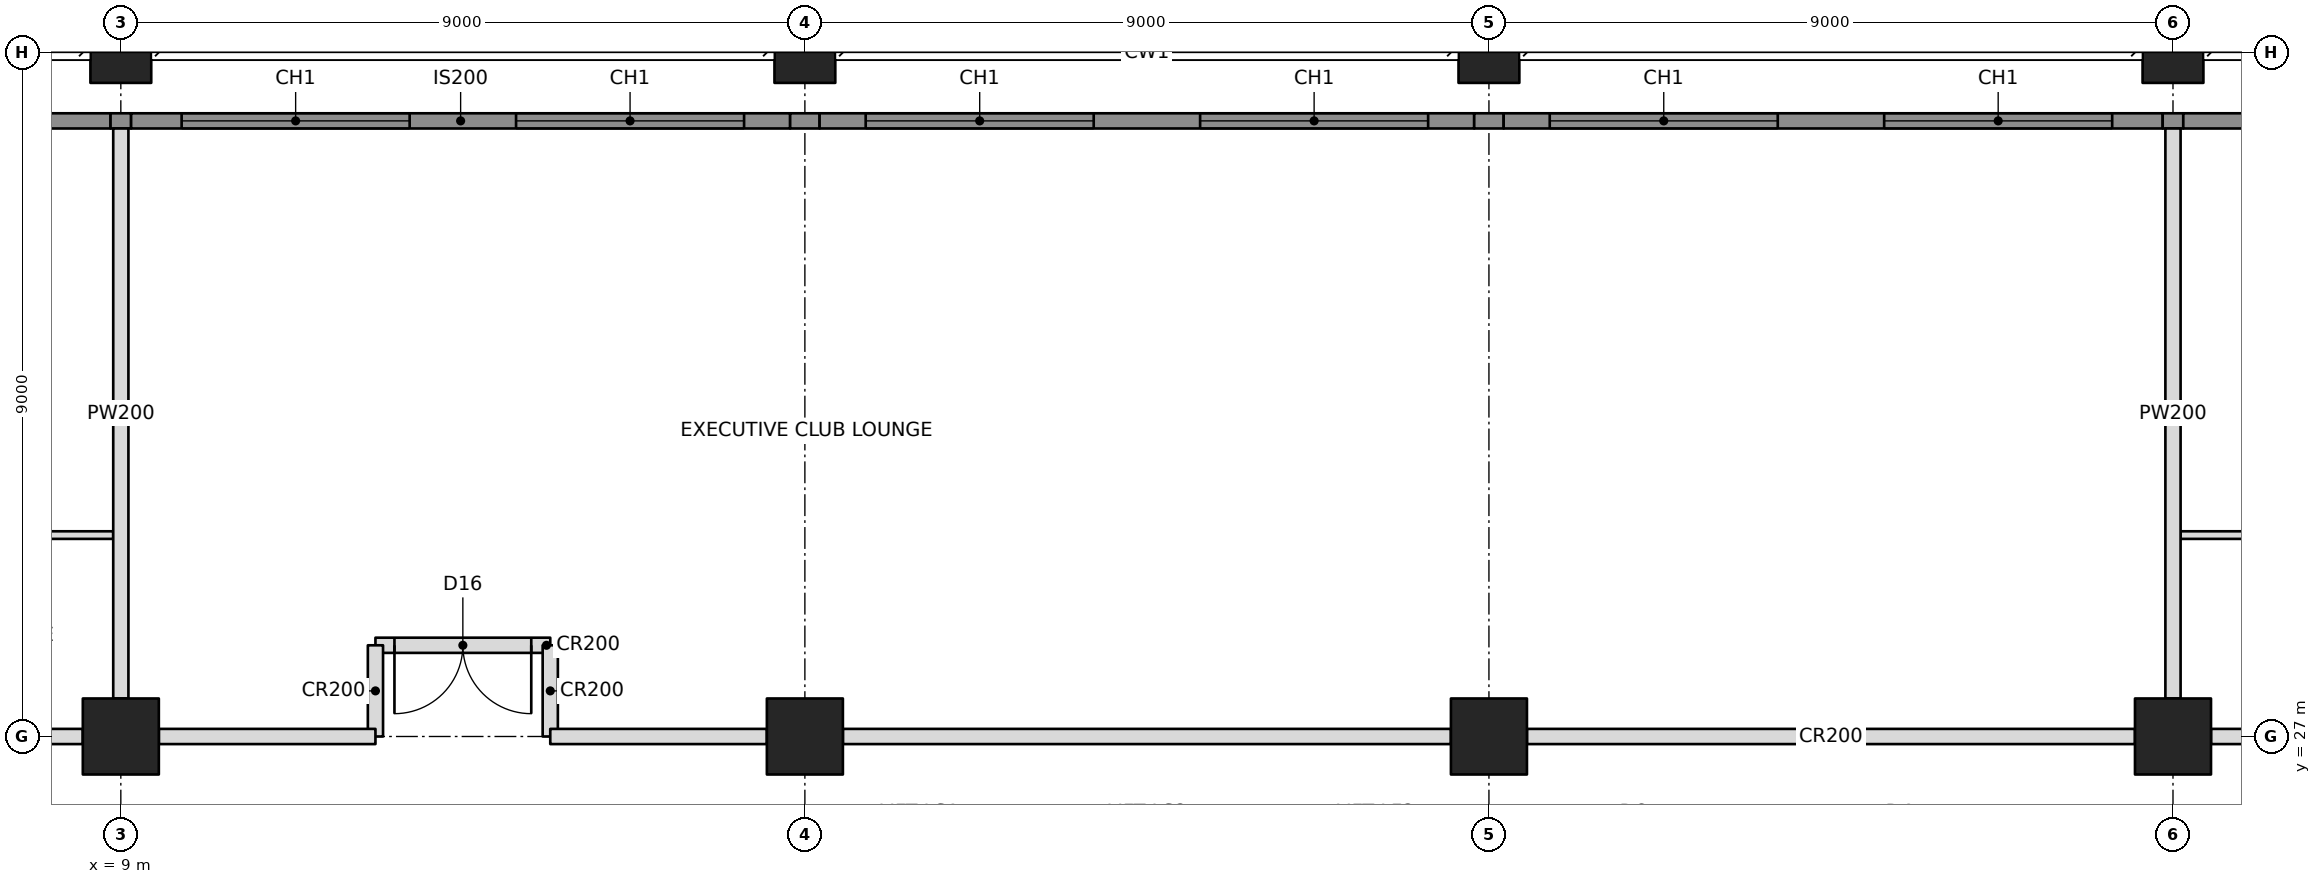
"""IFC4 building model, lengths in metres.
Left out: names, types, materials, properties, quantities, classifications, styles, units other than length and angle.
Written with IfcOpenShell. Run it as: python <this file> out.ifc"""

import sys

from ifc_helpers import new_model, si_unit, direction, frame, frame_2d, origin, origin_2d, place, context, subcontext, project, spatial, rectangle, hollow_rectangle, extrude, element, fill, save


model = new_model("IFC4")
c1 = context("Model", 3, precision=1e-05, world=origin(), true_north=direction((0.0, 1.0)))
c2 = subcontext(c1, "Body", "Model", "MODEL_VIEW")
j1 = project(units=[si_unit("LENGTHUNIT", "METRE"), si_unit("PLANEANGLEUNIT", "RADIAN")], contexts=[c1])
p1 = place(None, origin())
s1 = spatial("IfcSite", under=j1, at=p1, CompositionType="ELEMENT")
p2 = place(p1, origin())
s2 = spatial("IfcBuilding", under=s1, at=p2, CompositionType="ELEMENT")
p3 = place(p2, frame((0.0, 0.0, 94.2)))
s3 = spatial("IfcBuildingStorey", under=s2, at=p3, CompositionType="ELEMENT", Elevation=94.2)
p4 = place(p3, frame((9.0, 27.0, 0.0), z_axis=(0.0, 0.0, 1.0), x_axis=(1.0, 0.0, 0.0)))
e1 = element("IfcColumn", 1, at=p4, inside=s3, PredefinedType="COLUMN", context=c2, shape_type="SweptSolid", body=[
    extrude(hollow_rectangle(XDim=1.0, YDim=1.0, WallThickness=0.1, at=origin_2d()), origin(), (0.0, 0.0, 1.0), 3.4),
])
p5 = place(p3, frame((9.0, 36.0, 0.0), z_axis=(0.0, 0.0, 1.0), x_axis=(1.0, 0.0, 0.0)))
e2 = element("IfcColumn", 2, at=p5, inside=s3, PredefinedType="COLUMN", context=c2, shape_type="SweptSolid", body=[
    extrude(hollow_rectangle(XDim=0.8, YDim=0.8, WallThickness=0.07, at=origin_2d()), origin(), (0.0, 0.0, 1.0), 3.4),
])
p6 = place(p3, frame((18.0, 27.0, 0.0), z_axis=(0.0, 0.0, 1.0), x_axis=(1.0, 0.0, 0.0)))
e3 = element("IfcColumn", 3, at=p6, inside=s3, PredefinedType="COLUMN", context=c2, shape_type="SweptSolid", body=[
    extrude(hollow_rectangle(XDim=1.0, YDim=1.0, WallThickness=0.1, at=origin_2d()), origin(), (0.0, 0.0, 1.0), 3.4),
])
p7 = place(p3, frame((18.0, 36.0, 0.0), z_axis=(0.0, 0.0, 1.0), x_axis=(1.0, 0.0, 0.0)))
e4 = element("IfcColumn", 4, at=p7, inside=s3, PredefinedType="COLUMN", context=c2, shape_type="SweptSolid", body=[
    extrude(hollow_rectangle(XDim=0.8, YDim=0.8, WallThickness=0.07, at=origin_2d()), origin(), (0.0, 0.0, 1.0), 3.4),
])
p8 = place(p3, frame((27.0, 27.0, 0.0), z_axis=(0.0, 0.0, 1.0), x_axis=(1.0, 0.0, 0.0)))
e5 = element("IfcColumn", 5, at=p8, inside=s3, PredefinedType="COLUMN", context=c2, shape_type="SweptSolid", body=[
    extrude(hollow_rectangle(XDim=1.0, YDim=1.0, WallThickness=0.1, at=origin_2d()), origin(), (0.0, 0.0, 1.0), 3.4),
])
p9 = place(p3, frame((27.0, 36.0, 0.0), z_axis=(0.0, 0.0, 1.0), x_axis=(1.0, 0.0, 0.0)))
e6 = element("IfcColumn", 6, at=p9, inside=s3, PredefinedType="COLUMN", context=c2, shape_type="SweptSolid", body=[
    extrude(hollow_rectangle(XDim=0.8, YDim=0.8, WallThickness=0.07, at=origin_2d()), origin(), (0.0, 0.0, 1.0), 3.4),
])
p10 = place(p3, frame((36.0, 27.0, 0.0), z_axis=(0.0, 0.0, 1.0), x_axis=(1.0, 0.0, 0.0)))
e7 = element("IfcColumn", 7, at=p10, inside=s3, PredefinedType="COLUMN", context=c2, shape_type="SweptSolid", body=[
    extrude(hollow_rectangle(XDim=1.0, YDim=1.0, WallThickness=0.1, at=origin_2d()), origin(), (0.0, 0.0, 1.0), 3.4),
])
p11 = place(p3, frame((36.0, 36.0, 0.0), z_axis=(0.0, 0.0, 1.0), x_axis=(1.0, 0.0, 0.0)))
e8 = element("IfcColumn", 8, at=p11, inside=s3, PredefinedType="COLUMN", context=c2, shape_type="SweptSolid", body=[
    extrude(hollow_rectangle(XDim=0.8, YDim=0.8, WallThickness=0.07, at=origin_2d()), origin(), (0.0, 0.0, 1.0), 3.4),
])
p12 = place(p3, frame((3.0, 35.1, 0.0), z_axis=(0.0, 0.0, 1.0), x_axis=(1.0, 0.0, 0.0)))
e9 = element("IfcWall", 9, at=p12, inside=s3, PredefinedType="SOLIDWALL", context=c2, shape_type="SweptSolid", body=[
    extrude(rectangle(XDim=5.865, YDim=0.2, at=frame_2d((2.932, 0.0))), origin(), (0.0, 0.0, 1.0), 3.2),
])
p13 = place(p12, frame((1.45, 0.0, 0.6)))
e10 = element("IfcOpeningElement", 10, at=p13, cuts=e9, PredefinedType="OPENING", context=c2, shape_type="SweptSolid", body=[
    extrude(rectangle(XDim=3.0, YDim=2.2, at=frame_2d((1.5, 1.1))), frame((0.0, 0.11, 0.0), z_axis=(0.0, -1.0, 0.0), x_axis=(1.0, 0.0, 0.0)), (0.0, 0.0, 1.0), 0.22),
])
p14 = place(p3, frame((1.0, 27.0, 0.0), z_axis=(0.0, 0.0, 1.0), x_axis=(1.0, 0.0, 0.0)))
e11 = element("IfcWall", 11, at=p14, inside=s3, PredefinedType="PARTITIONING", context=c2, shape_type="SweptSolid", body=[
    extrude(rectangle(XDim=7.5, YDim=0.2, at=frame_2d((3.75, 0.0))), origin(), (0.0, 0.0, 1.0), 2.438),
])
p15 = place(p14, frame((0.25, 0.0, 0.0)))
e12 = element("IfcOpeningElement", 12, at=p15, cuts=e11, PredefinedType="OPENING", context=c2, shape_type="SweptSolid", body=[
    extrude(rectangle(XDim=0.9, YDim=2.1, at=frame_2d((0.45, 1.05))), frame((0.0, 0.11, 0.0), z_axis=(0.0, -1.0, 0.0), x_axis=(1.0, 0.0, 0.0)), (0.0, 0.0, 1.0), 0.22),
])
p16 = place(p3, frame((9.5, 27.0, 0.0), z_axis=(0.0, 0.0, 1.0), x_axis=(1.0, 0.0, 0.0)))
e13 = element("IfcWall", 13, at=p16, inside=s3, PredefinedType="PARTITIONING", context=c2, shape_type="SweptSolid", body=[
    extrude(rectangle(XDim=2.85, YDim=0.2, at=frame_2d((1.425, 0.0))), origin(), (0.0, 0.0, 1.0), 2.405),
])
for number, where, z_axis, x_axis in (
    (14, (18.5, 27.0, 0.0), (0.0, 0.0, 1.0), (1.0, 0.0, 0.0)),
    (15, (27.5, 27.0, 0.0), (0.0, 0.0, 1.0), (1.0, 0.0, 0.0)),
):
    element("IfcWall", number, at=place(p3, frame(where, z_axis=z_axis, x_axis=x_axis)), inside=s3, PredefinedType="PARTITIONING", context=c2, shape_type="SweptSolid", body=[
        extrude(rectangle(XDim=8.0, YDim=0.2, at=frame_2d((4.0, 0.0))), origin(), (0.0, 0.0, 1.0), 2.405),
    ])
p17 = place(p3, frame((36.5, 27.0, 0.0), z_axis=(0.0, 0.0, 1.0), x_axis=(1.0, 0.0, 0.0)))
e16 = element("IfcWall", 16, at=p17, inside=s3, PredefinedType="PARTITIONING", context=c2, shape_type="SweptSolid", body=[
    extrude(rectangle(XDim=7.5, YDim=0.2, at=frame_2d((3.75, 0.0))), origin(), (0.0, 0.0, 1.0), 2.438),
])
p18 = place(p17, frame((6.35, 0.0, 0.0)))
e17 = element("IfcOpeningElement", 17, at=p18, cuts=e16, PredefinedType="OPENING", context=c2, shape_type="SweptSolid", body=[
    extrude(rectangle(XDim=0.9, YDim=2.1, at=frame_2d((0.45, 1.05))), frame((0.0, 0.11, 0.0), z_axis=(0.0, -1.0, 0.0), x_axis=(1.0, 0.0, 0.0)), (0.0, 0.0, 1.0), 0.22),
])
for number, where, z_axis, x_axis in (
    (18, (9.0, 27.5, 0.0), (0.0, 0.0, 1.0), (0.0, 1.0, 0.0)),
    (19, (36.0, 27.5, 0.0), (0.0, 0.0, 1.0), (0.0, 1.0, 0.0)),
):
    element("IfcWall", number, at=place(p3, frame(where, z_axis=z_axis, x_axis=x_axis)), inside=s3, PredefinedType="PARTITIONING", context=c2, shape_type="SweptSolid", body=[
        extrude(rectangle(XDim=7.5, YDim=0.2, at=frame_2d((3.75, 0.0))), origin(), (0.0, 0.0, 1.0), 2.438),
    ])
p19 = place(p3, frame((5.45, 29.65, 0.0), z_axis=(0.0, 0.0, 1.0), x_axis=(1.0, 0.0, 0.0)))
e20 = element("IfcWall", 20, at=p19, inside=s3, PredefinedType="PARTITIONING", context=c2, shape_type="SweptSolid", body=[
    extrude(rectangle(XDim=3.45, YDim=0.1, at=frame_2d((1.725, 0.0))), origin(), (0.0, 0.0, 1.0), 2.438),
])
p20 = place(p3, frame((14.65, 27.0, 0.0), z_axis=(0.0, 0.0, 1.0), x_axis=(1.0, 0.0, 0.0)))
e21 = element("IfcWall", 21, at=p20, inside=s3, PredefinedType="PARTITIONING", context=c2, shape_type="SweptSolid", body=[
    extrude(rectangle(XDim=2.85, YDim=0.2, at=frame_2d((1.425, 0.0))), origin(), (0.0, 0.0, 1.0), 2.405),
])
for number, where, z_axis, x_axis in (
    (22, (12.35, 27.0, 0.0), (0.0, 0.0, 1.0), (0.0, 1.0, 0.0)),
    (23, (14.65, 27.0, 0.0), (0.0, 0.0, 1.0), (0.0, 1.0, 0.0)),
):
    element("IfcWall", number, at=place(p3, frame(where, z_axis=z_axis, x_axis=x_axis)), inside=s3, PredefinedType="PARTITIONING", context=c2, shape_type="SweptSolid", body=[
        extrude(rectangle(XDim=1.2, YDim=0.2, at=frame_2d((0.6, 0.0))), origin(), (0.0, 0.0, 1.0), 2.404),
    ])
p21 = place(p3, frame((12.35, 28.2, 0.0), z_axis=(0.0, 0.0, 1.0), x_axis=(1.0, 0.0, 0.0)))
e24 = element("IfcWall", 24, at=p21, inside=s3, PredefinedType="PARTITIONING", context=c2, shape_type="SweptSolid", body=[
    extrude(rectangle(XDim=2.3, YDim=0.2, at=frame_2d((1.15, 0.0))), origin(), (0.0, 0.0, 1.0), 3.2),
])
p22 = place(p21, frame((0.25, 0.0, 0.0)))
e25 = element("IfcOpeningElement", 25, at=p22, cuts=e24, PredefinedType="OPENING", context=c2, shape_type="SweptSolid", body=[
    extrude(rectangle(XDim=1.8, YDim=2.4, at=frame_2d((0.9, 1.2))), frame((0.0, 0.11, 0.0), z_axis=(0.0, -1.0, 0.0), x_axis=(1.0, 0.0, 0.0)), (0.0, 0.0, 1.0), 0.22),
])
p23 = place(p3, frame((36.1, 29.65, 0.0), z_axis=(0.0, 0.0, 1.0), x_axis=(1.0, 0.0, 0.0)))
e26 = element("IfcWall", 26, at=p23, inside=s3, PredefinedType="PARTITIONING", context=c2, shape_type="SweptSolid", body=[
    extrude(rectangle(XDim=3.45, YDim=0.1, at=frame_2d((1.725, 0.0))), origin(), (0.0, 0.0, 1.0), 2.438),
])
p24 = place(p3, frame((8.865, 35.1, 0.0), z_axis=(0.0, 0.0, 1.0), x_axis=(1.0, 0.0, 0.0)))
e27 = element("IfcWall", 27, at=p24, inside=s3, PredefinedType="SOLIDWALL", context=c2, shape_type="SweptSolid", body=[
    extrude(rectangle(XDim=0.271, YDim=0.2, at=frame_2d((0.135, 0.0))), origin(), (0.0, 0.0, 1.0), 2.438),
])
p25 = place(p3, frame((9.135, 35.1, 0.0), z_axis=(0.0, 0.0, 1.0), x_axis=(1.0, 0.0, 0.0)))
e28 = element("IfcWall", 28, at=p25, inside=s3, PredefinedType="SOLIDWALL", context=c2, shape_type="SweptSolid", body=[
    extrude(rectangle(XDim=8.671, YDim=0.2, at=frame_2d((4.335, 0.0))), origin(), (0.0, 0.0, 1.0), 3.2),
])
p26 = place(p25, frame((0.665, 0.0, 0.6)))
e29 = element("IfcOpeningElement", 29, at=p26, cuts=e28, PredefinedType="OPENING", context=c2, shape_type="SweptSolid", body=[
    extrude(rectangle(XDim=3.0, YDim=2.2, at=frame_2d((1.5, 1.1))), frame((0.0, 0.11, 0.0), z_axis=(0.0, -1.0, 0.0), x_axis=(1.0, 0.0, 0.0)), (0.0, 0.0, 1.0), 0.22),
])
p27 = place(p25, frame((5.065, 0.0, 0.6)))
e30 = element("IfcOpeningElement", 30, at=p27, cuts=e28, PredefinedType="OPENING", context=c2, shape_type="SweptSolid", body=[
    extrude(rectangle(XDim=3.0, YDim=2.2, at=frame_2d((1.5, 1.1))), frame((0.0, 0.11, 0.0), z_axis=(0.0, -1.0, 0.0), x_axis=(1.0, 0.0, 0.0)), (0.0, 0.0, 1.0), 0.22),
])
p28 = place(p3, frame((17.806, 35.1, 0.0), z_axis=(0.0, 0.0, 1.0), x_axis=(1.0, 0.0, 0.0)))
e31 = element("IfcWall", 31, at=p28, inside=s3, PredefinedType="SOLIDWALL", context=c2, shape_type="SweptSolid", body=[
    extrude(rectangle(XDim=0.388, YDim=0.2, at=frame_2d((0.194, 0.0))), origin(), (0.0, 0.0, 1.0), 2.404),
])
p29 = place(p3, frame((18.194, 35.1, 0.0), z_axis=(0.0, 0.0, 1.0), x_axis=(1.0, 0.0, 0.0)))
e32 = element("IfcWall", 32, at=p29, inside=s3, PredefinedType="SOLIDWALL", context=c2, shape_type="SweptSolid", body=[
    extrude(rectangle(XDim=8.612, YDim=0.2, at=frame_2d((4.306, 0.0))), origin(), (0.0, 0.0, 1.0), 3.2),
])
p30 = place(p29, frame((0.606, 0.0, 0.6)))
e33 = element("IfcOpeningElement", 33, at=p30, cuts=e32, PredefinedType="OPENING", context=c2, shape_type="SweptSolid", body=[
    extrude(rectangle(XDim=3.0, YDim=2.2, at=frame_2d((1.5, 1.1))), frame((0.0, 0.11, 0.0), z_axis=(0.0, -1.0, 0.0), x_axis=(1.0, 0.0, 0.0)), (0.0, 0.0, 1.0), 0.22),
])
p31 = place(p29, frame((5.006, 0.0, 0.6)))
e34 = element("IfcOpeningElement", 34, at=p31, cuts=e32, PredefinedType="OPENING", context=c2, shape_type="SweptSolid", body=[
    extrude(rectangle(XDim=3.0, YDim=2.2, at=frame_2d((1.5, 1.1))), frame((0.0, 0.11, 0.0), z_axis=(0.0, -1.0, 0.0), x_axis=(1.0, 0.0, 0.0)), (0.0, 0.0, 1.0), 0.22),
])
p32 = place(p3, frame((26.806, 35.1, 0.0), z_axis=(0.0, 0.0, 1.0), x_axis=(1.0, 0.0, 0.0)))
e35 = element("IfcWall", 35, at=p32, inside=s3, PredefinedType="SOLIDWALL", context=c2, shape_type="SweptSolid", body=[
    extrude(rectangle(XDim=0.388, YDim=0.2, at=frame_2d((0.194, 0.0))), origin(), (0.0, 0.0, 1.0), 2.404),
])
p33 = place(p3, frame((27.194, 35.1, 0.0), z_axis=(0.0, 0.0, 1.0), x_axis=(1.0, 0.0, 0.0)))
e36 = element("IfcWall", 36, at=p33, inside=s3, PredefinedType="SOLIDWALL", context=c2, shape_type="SweptSolid", body=[
    extrude(rectangle(XDim=8.671, YDim=0.2, at=frame_2d((4.335, 0.0))), origin(), (0.0, 0.0, 1.0), 3.2),
])
p34 = place(p33, frame((0.606, 0.0, 0.6)))
e37 = element("IfcOpeningElement", 37, at=p34, cuts=e36, PredefinedType="OPENING", context=c2, shape_type="SweptSolid", body=[
    extrude(rectangle(XDim=3.0, YDim=2.2, at=frame_2d((1.5, 1.1))), frame((0.0, 0.11, 0.0), z_axis=(0.0, -1.0, 0.0), x_axis=(1.0, 0.0, 0.0)), (0.0, 0.0, 1.0), 0.22),
])
p35 = place(p33, frame((5.006, 0.0, 0.6)))
e38 = element("IfcOpeningElement", 38, at=p35, cuts=e36, PredefinedType="OPENING", context=c2, shape_type="SweptSolid", body=[
    extrude(rectangle(XDim=3.0, YDim=2.2, at=frame_2d((1.5, 1.1))), frame((0.0, 0.11, 0.0), z_axis=(0.0, -1.0, 0.0), x_axis=(1.0, 0.0, 0.0)), (0.0, 0.0, 1.0), 0.22),
])
p36 = place(p3, frame((35.865, 35.1, 0.0), z_axis=(0.0, 0.0, 1.0), x_axis=(1.0, 0.0, 0.0)))
e39 = element("IfcWall", 39, at=p36, inside=s3, PredefinedType="SOLIDWALL", context=c2, shape_type="SweptSolid", body=[
    extrude(rectangle(XDim=0.271, YDim=0.2, at=frame_2d((0.135, 0.0))), origin(), (0.0, 0.0, 1.0), 2.438),
])
p37 = place(p3, frame((36.135, 35.1, 0.0), z_axis=(0.0, 0.0, 1.0), x_axis=(1.0, 0.0, 0.0)))
e40 = element("IfcWall", 40, at=p37, inside=s3, PredefinedType="SOLIDWALL", context=c2, shape_type="SweptSolid", body=[
    extrude(rectangle(XDim=5.865, YDim=0.2, at=frame_2d((2.932, 0.0))), origin(), (0.0, 0.0, 1.0), 3.2),
])
p38 = place(p37, frame((1.415, 0.0, 0.6)))
e41 = element("IfcOpeningElement", 41, at=p38, cuts=e40, PredefinedType="OPENING", context=c2, shape_type="SweptSolid", body=[
    extrude(rectangle(XDim=3.0, YDim=2.2, at=frame_2d((1.5, 1.1))), frame((0.0, 0.11, 0.0), z_axis=(0.0, -1.0, 0.0), x_axis=(1.0, 0.0, 0.0)), (0.0, 0.0, 1.0), 0.22),
])
p39 = place(p26, origin())
e42 = element("IfcWindow", 42, at=p39, inside=s3, PartitioningType="TRIPLE_PANEL_VERTICAL", PredefinedType="WINDOW", context=c2, shape_type="SweptSolid", body=[
    extrude(rectangle(XDim=3.0, YDim=2.2, at=frame_2d((1.5, 1.1))), frame((0.0, 0.03, 0.0), z_axis=(0.0, -1.0, 0.0), x_axis=(1.0, 0.0, 0.0)), (0.0, 0.0, 1.0), 0.06),
])
fill(e29, e42)
p40 = place(p27, origin())
e43 = element("IfcWindow", 43, at=p40, inside=s3, PartitioningType="TRIPLE_PANEL_VERTICAL", PredefinedType="WINDOW", context=c2, shape_type="SweptSolid", body=[
    extrude(rectangle(XDim=3.0, YDim=2.2, at=frame_2d((1.5, 1.1))), frame((0.0, 0.03, 0.0), z_axis=(0.0, -1.0, 0.0), x_axis=(1.0, 0.0, 0.0)), (0.0, 0.0, 1.0), 0.06),
])
fill(e30, e43)
p41 = place(p30, origin())
e44 = element("IfcWindow", 44, at=p41, inside=s3, PartitioningType="TRIPLE_PANEL_VERTICAL", PredefinedType="WINDOW", context=c2, shape_type="SweptSolid", body=[
    extrude(rectangle(XDim=3.0, YDim=2.2, at=frame_2d((1.5, 1.1))), frame((0.0, 0.03, 0.0), z_axis=(0.0, -1.0, 0.0), x_axis=(1.0, 0.0, 0.0)), (0.0, 0.0, 1.0), 0.06),
])
fill(e33, e44)
p42 = place(p31, origin())
e45 = element("IfcWindow", 45, at=p42, inside=s3, PartitioningType="TRIPLE_PANEL_VERTICAL", PredefinedType="WINDOW", context=c2, shape_type="SweptSolid", body=[
    extrude(rectangle(XDim=3.0, YDim=2.2, at=frame_2d((1.5, 1.1))), frame((0.0, 0.03, 0.0), z_axis=(0.0, -1.0, 0.0), x_axis=(1.0, 0.0, 0.0)), (0.0, 0.0, 1.0), 0.06),
])
fill(e34, e45)
p43 = place(p34, origin())
e46 = element("IfcWindow", 46, at=p43, inside=s3, PartitioningType="TRIPLE_PANEL_VERTICAL", PredefinedType="WINDOW", context=c2, shape_type="SweptSolid", body=[
    extrude(rectangle(XDim=3.0, YDim=2.2, at=frame_2d((1.5, 1.1))), frame((0.0, 0.03, 0.0), z_axis=(0.0, -1.0, 0.0), x_axis=(1.0, 0.0, 0.0)), (0.0, 0.0, 1.0), 0.06),
])
fill(e37, e46)
p44 = place(p35, origin())
e47 = element("IfcWindow", 47, at=p44, inside=s3, PartitioningType="TRIPLE_PANEL_VERTICAL", PredefinedType="WINDOW", context=c2, shape_type="SweptSolid", body=[
    extrude(rectangle(XDim=3.0, YDim=2.2, at=frame_2d((1.5, 1.1))), frame((0.0, 0.03, 0.0), z_axis=(0.0, -1.0, 0.0), x_axis=(1.0, 0.0, 0.0)), (0.0, 0.0, 1.0), 0.06),
])
fill(e38, e47)
p45 = place(p22, frame((1.8, 0.0, 0.0), z_axis=(0.0, 0.0, 1.0), x_axis=(-1.0, 0.0, 0.0)))
e48 = element("IfcDoor", 48, at=p45, inside=s3, OperationType="DOUBLE_DOOR_SINGLE_SWING", PredefinedType="DOOR", context=c2, shape_type="SweptSolid", body=[
    extrude(rectangle(XDim=1.8, YDim=2.4, at=frame_2d((0.9, 1.2))), frame((0.0, 0.025, 0.0), z_axis=(0.0, -1.0, 0.0), x_axis=(1.0, 0.0, 0.0)), (0.0, 0.0, 1.0), 0.05),
])
fill(e25, e48)
save(model, sys.argv[1])
